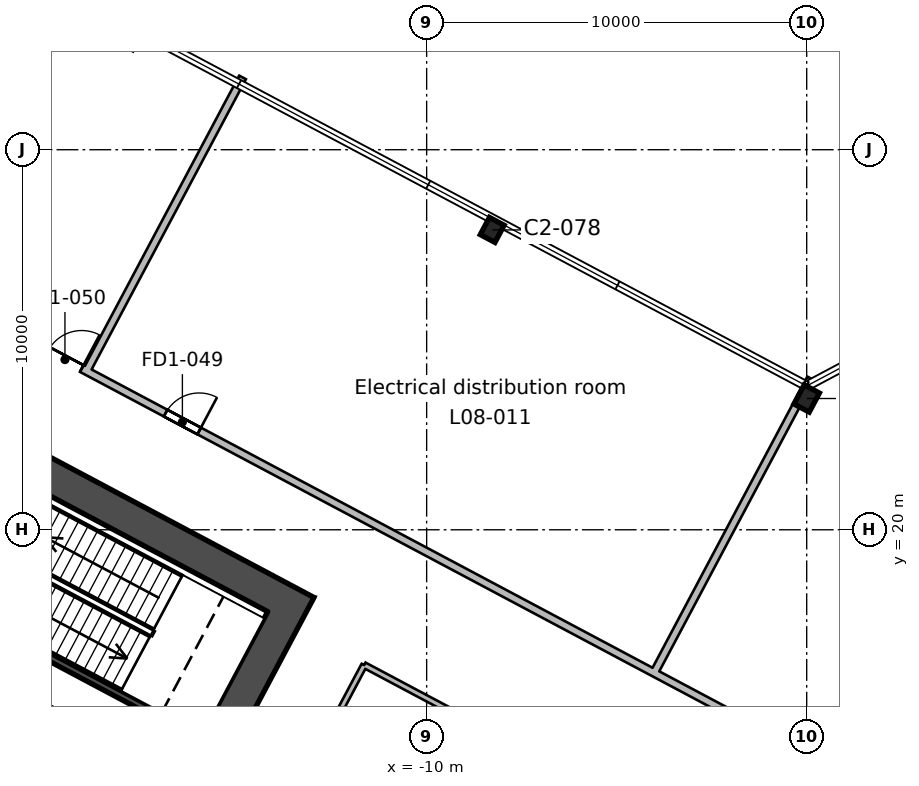
"""IFC4 building model, lengths in metres.
Left out: names, types, materials, properties, quantities, classifications, styles, units other than length and angle.
Written with IfcOpenShell. Run it as: python <this file> out.ifc"""

import sys

from ifc_helpers import new_model, si_unit, direction, frame, frame_2d, origin, origin_2d, place, context, subcontext, project, spatial, rectangle, i_section, extrude, element, fill, save


model = new_model("IFC4")
c1 = context("Model", 3, precision=1e-05, world=origin(), true_north=direction((0.0, 1.0)))
c2 = subcontext(c1, "Body", "Model", "MODEL_VIEW")
j1 = project(units=[si_unit("LENGTHUNIT", "METRE"), si_unit("PLANEANGLEUNIT", "RADIAN")], contexts=[c1])
p1 = place(None, origin())
s1 = spatial("IfcSite", under=j1, at=p1, CompositionType="ELEMENT")
p2 = place(p1, origin())
s2 = spatial("IfcBuilding", under=s1, at=p2, CompositionType="ELEMENT")
p3 = place(p2, frame((0.0, 0.0, 44.6)))
s3 = spatial("IfcBuildingStorey", under=s2, at=p3, CompositionType="ELEMENT", Elevation=44.6)
p4 = place(p3, frame((0.0, 23.454, 0.0), z_axis=(0.0, 0.0, 1.0), x_axis=(-0.882947592859, 0.469471562786, 0.0)))
e1 = element("IfcColumn", 1, at=p4, inside=s3, PredefinedType="COLUMN", context=c2, shape_type="SweptSolid", body=[
    extrude(i_section(OverallWidth=0.455, OverallDepth=0.569, WebThickness=0.078, FlangeThickness=0.125, FilletRadius=0.015, at=origin_2d()), origin(), (0.0, 0.0, 1.0), 5.4),
])
p5 = place(p3, frame((-8.275, 27.89, 0.0), z_axis=(0.0, 0.0, 1.0), x_axis=(-0.882947592859, 0.469471562786, 0.0)))
e2 = element("IfcColumn", 2, at=p5, inside=s3, PredefinedType="COLUMN", context=c2, shape_type="SweptSolid", body=[
    extrude(i_section(OverallWidth=0.437, OverallDepth=0.513, WebThickness=0.061, FlangeThickness=0.097, FilletRadius=0.015, at=origin_2d()), origin(), (0.0, 0.0, 1.0), 5.4),
])
p6 = place(p3, frame((-13.362, 18.43, 0.0), z_axis=(0.0, 0.0, 1.0), x_axis=(-0.46947084998, -0.882947971864, 0.0)))
e3 = element("IfcWall", 3, at=p6, inside=s3, PredefinedType="SHEAR", context=c2, shape_type="SweptSolid", body=[
    extrude(rectangle(XDim=20.0, YDim=0.9, at=frame_2d((10.0, 0.0))), origin(), (0.0, 0.0, 1.0), 5.4),
])
p7 = place(p6, frame((7.0, 0.0, 0.0)))
e4 = element("IfcOpeningElement", 4, at=p7, cuts=e3, PredefinedType="OPENING", context=c2, shape_type="SweptSolid", body=[
    extrude(rectangle(XDim=2.4, YDim=2.4, at=frame_2d((1.2, 1.2))), frame((0.0, 0.46, 0.0), z_axis=(0.0, -1.0, 0.0), x_axis=(1.0, 0.0, 0.0)), (0.0, 0.0, 1.0), 0.92),
])
p8 = place(p3, frame((-13.97, 18.244, 0.0), z_axis=(0.0, 0.0, 1.0), x_axis=(-0.88294509198, 0.469476266226, 0.0)))
e5 = element("IfcWall", 5, at=p8, inside=s3, PredefinedType="SHEAR", context=c2, shape_type="SweptSolid", body=[
    extrude(rectangle(XDim=20.2, YDim=0.9, at=frame_2d((10.1, 0.0))), origin(), (0.0, 0.0, 1.0), 5.4),
])
p9 = place(p3, frame((-15.942, 14.536, 0.0), z_axis=(0.0, 0.0, 1.0), x_axis=(-0.882946947542, 0.469472776449, 0.0)))
e6 = element("IfcWall", 6, at=p9, inside=s3, PredefinedType="SHEAR", context=c2, shape_type="SweptSolid", body=[
    extrude(rectangle(XDim=8.0, YDim=0.2, at=frame_2d((4.0, 0.0))), origin(), (0.0, 0.0, 1.0), 5.4),
])
p10 = place(p3, frame((-16.529, 13.432, 0.0), z_axis=(0.0, 0.0, 1.0), x_axis=(-0.88295287151, 0.469461634952, 0.0)))
e7 = element("IfcWall", 7, at=p10, inside=s3, PredefinedType="SHEAR", context=c2, shape_type="SweptSolid", body=[
    extrude(rectangle(XDim=8.0, YDim=0.2, at=frame_2d((4.0, 0.0))), origin(), (0.0, 0.0, 1.0), 5.4),
])
p11 = place(p3, frame((-32.894, 31.59, 0.0), z_axis=(0.0, 0.0, 1.0), x_axis=(0.882948512555, -0.469469833085, 0.0)))
e8 = element("IfcWall", 8, at=p11, inside=s3, PredefinedType="PARTITIONING", context=c2, shape_type="SweptSolid", body=[
    extrude(rectangle(XDim=37.255, YDim=0.2, at=frame_2d((18.627, 0.0))), origin(), (0.0, 0.0, 1.0), 4.95),
])
p12 = place(p11, frame((18.15, 0.0, 0.0)))
e9 = element("IfcOpeningElement", 9, at=p12, cuts=e8, PredefinedType="OPENING", context=c2, shape_type="SweptSolid", body=[
    extrude(rectangle(XDim=1.0, YDim=2.1, at=frame_2d((0.5, 1.05))), frame((0.0, 0.11, 0.0), z_axis=(0.0, -1.0, 0.0), x_axis=(1.0, 0.0, 0.0)), (0.0, 0.0, 1.0), 0.22),
])
p13 = place(p11, frame((14.65, 0.0, 0.0)))
e10 = element("IfcOpeningElement", 10, at=p13, cuts=e8, PredefinedType="OPENING", context=c2, shape_type="SweptSolid", body=[
    extrude(rectangle(XDim=1.0, YDim=2.1, at=frame_2d((0.5, 1.05))), frame((0.0, 0.11, 0.0), z_axis=(0.0, -1.0, 0.0), x_axis=(1.0, 0.0, 0.0)), (0.0, 0.0, 1.0), 0.22),
])
p14 = place(p3, frame((0.0, 14.1, 0.0), z_axis=(0.0, 0.0, 1.0), x_axis=(0.882945550769, 0.469475403378, 0.0)))
e11 = element("IfcWall", 11, at=p14, inside=s3, PredefinedType="PARTITIONING", context=c2, shape_type="SweptSolid", body=[
    extrude(rectangle(XDim=35.938, YDim=0.2, at=frame_2d((17.969, 0.0))), origin(), (0.0, 0.0, 1.0), 4.95),
])
p15 = place(p14, frame((30.95, 0.0, 0.0)))
e12 = element("IfcOpeningElement", 12, at=p15, cuts=e11, PredefinedType="OPENING", context=c2, shape_type="SweptSolid", body=[
    extrude(rectangle(XDim=1.0, YDim=2.1, at=frame_2d((0.5, 1.05))), frame((0.0, 0.11, 0.0), z_axis=(0.0, -1.0, 0.0), x_axis=(1.0, 0.0, 0.0)), (0.0, 0.0, 1.0), 0.22),
])
p16 = place(p14, frame((20.45, 0.0, 0.0)))
e13 = element("IfcOpeningElement", 13, at=p16, cuts=e11, PredefinedType="OPENING", context=c2, shape_type="SweptSolid", body=[
    extrude(rectangle(XDim=1.0, YDim=2.1, at=frame_2d((0.5, 1.05))), frame((0.0, 0.11, 0.0), z_axis=(0.0, -1.0, 0.0), x_axis=(1.0, 0.0, 0.0)), (0.0, 0.0, 1.0), 0.22),
])
p17 = place(p14, frame((17.45, 0.0, 0.0)))
e14 = element("IfcOpeningElement", 14, at=p17, cuts=e11, PredefinedType="OPENING", context=c2, shape_type="SweptSolid", body=[
    extrude(rectangle(XDim=1.0, YDim=2.1, at=frame_2d((0.5, 1.05))), frame((0.0, 0.11, 0.0), z_axis=(0.0, -1.0, 0.0), x_axis=(1.0, 0.0, 0.0)), (0.0, 0.0, 1.0), 0.22),
])
p18 = place(p3, frame((-14.844, 31.903, 0.0), z_axis=(0.0, 0.0, 1.0), x_axis=(-0.469374180568, -0.882999365014, 0.0)))
e15 = element("IfcWall", 15, at=p18, inside=s3, PredefinedType="PARTITIONING", context=c2, shape_type="SweptSolid", body=[
    extrude(rectangle(XDim=8.75, YDim=0.2, at=frame_2d((4.375, 0.0))), origin(), (0.0, 0.0, 1.0), 4.95),
])
p19 = place(p3, frame((-20.142, 0.46, 0.0), z_axis=(0.0, 0.0, 1.0), x_axis=(0.469506937019, 0.882928783136, 0.0)))
e16 = element("IfcWall", 16, at=p19, inside=s3, PredefinedType="PARTITIONING", context=c2, shape_type="SweptSolid", body=[
    extrude(rectangle(XDim=18.1, YDim=0.15, at=frame_2d((9.05, 0.0))), origin(), (0.0, 0.0, 1.0), 4.95),
])
p20 = place(p19, frame((8.55, 0.0, 0.0)))
e17 = element("IfcOpeningElement", 17, at=p20, cuts=e16, PredefinedType="OPENING", context=c2, shape_type="SweptSolid", body=[
    extrude(rectangle(XDim=1.0, YDim=2.1, at=frame_2d((0.5, 1.05))), frame((0.0, 0.085, 0.0), z_axis=(0.0, -1.0, 0.0), x_axis=(1.0, 0.0, 0.0)), (0.0, 0.0, 1.0), 0.17),
])
p21 = place(p3, frame((-11.644, 16.441, 0.0), z_axis=(0.0, 0.0, 1.0), x_axis=(0.882853947977, -0.469647640834, 0.0)))
e18 = element("IfcWall", 18, at=p21, inside=s3, PredefinedType="PARTITIONING", context=c2, shape_type="SweptSolid", body=[
    extrude(rectangle(XDim=3.153, YDim=0.15, at=frame_2d((1.577, 0.0))), origin(), (0.0, 0.0, 1.0), 4.95),
])
p22 = place(p3, frame((0.105, 23.984, 0.0), z_axis=(0.0, 0.0, 1.0), x_axis=(-0.469364726907, -0.883004390213, 0.0)))
e19 = element("IfcWall", 19, at=p22, inside=s3, PredefinedType="PARTITIONING", context=c2, shape_type="SweptSolid", body=[
    extrude(rectangle(XDim=8.775, YDim=0.2, at=frame_2d((4.388, 0.0))), origin(), (0.0, 0.0, 1.0), 4.95),
])
p23 = place(p12, origin())
e20 = element("IfcDoor", 20, at=p23, inside=s3, OperationType="SINGLE_SWING_RIGHT", PredefinedType="DOOR", context=c2, shape_type="SweptSolid", body=[
    extrude(rectangle(XDim=1.0, YDim=2.1, at=frame_2d((0.5, 1.05))), frame((0.0, 0.025, 0.0), z_axis=(0.0, -1.0, 0.0), x_axis=(1.0, 0.0, 0.0)), (0.0, 0.0, 1.0), 0.05),
])
fill(e9, e20)
p24 = place(p13, origin())
e21 = element("IfcDoor", 21, at=p24, inside=s3, OperationType="SINGLE_SWING_RIGHT", PredefinedType="DOOR", context=c2, shape_type="SweptSolid", body=[
    extrude(rectangle(XDim=1.0, YDim=2.1, at=frame_2d((0.5, 1.05))), frame((0.0, 0.025, 0.0), z_axis=(0.0, -1.0, 0.0), x_axis=(1.0, 0.0, 0.0)), (0.0, 0.0, 1.0), 0.05),
])
fill(e10, e21)
save(model, sys.argv[1])
